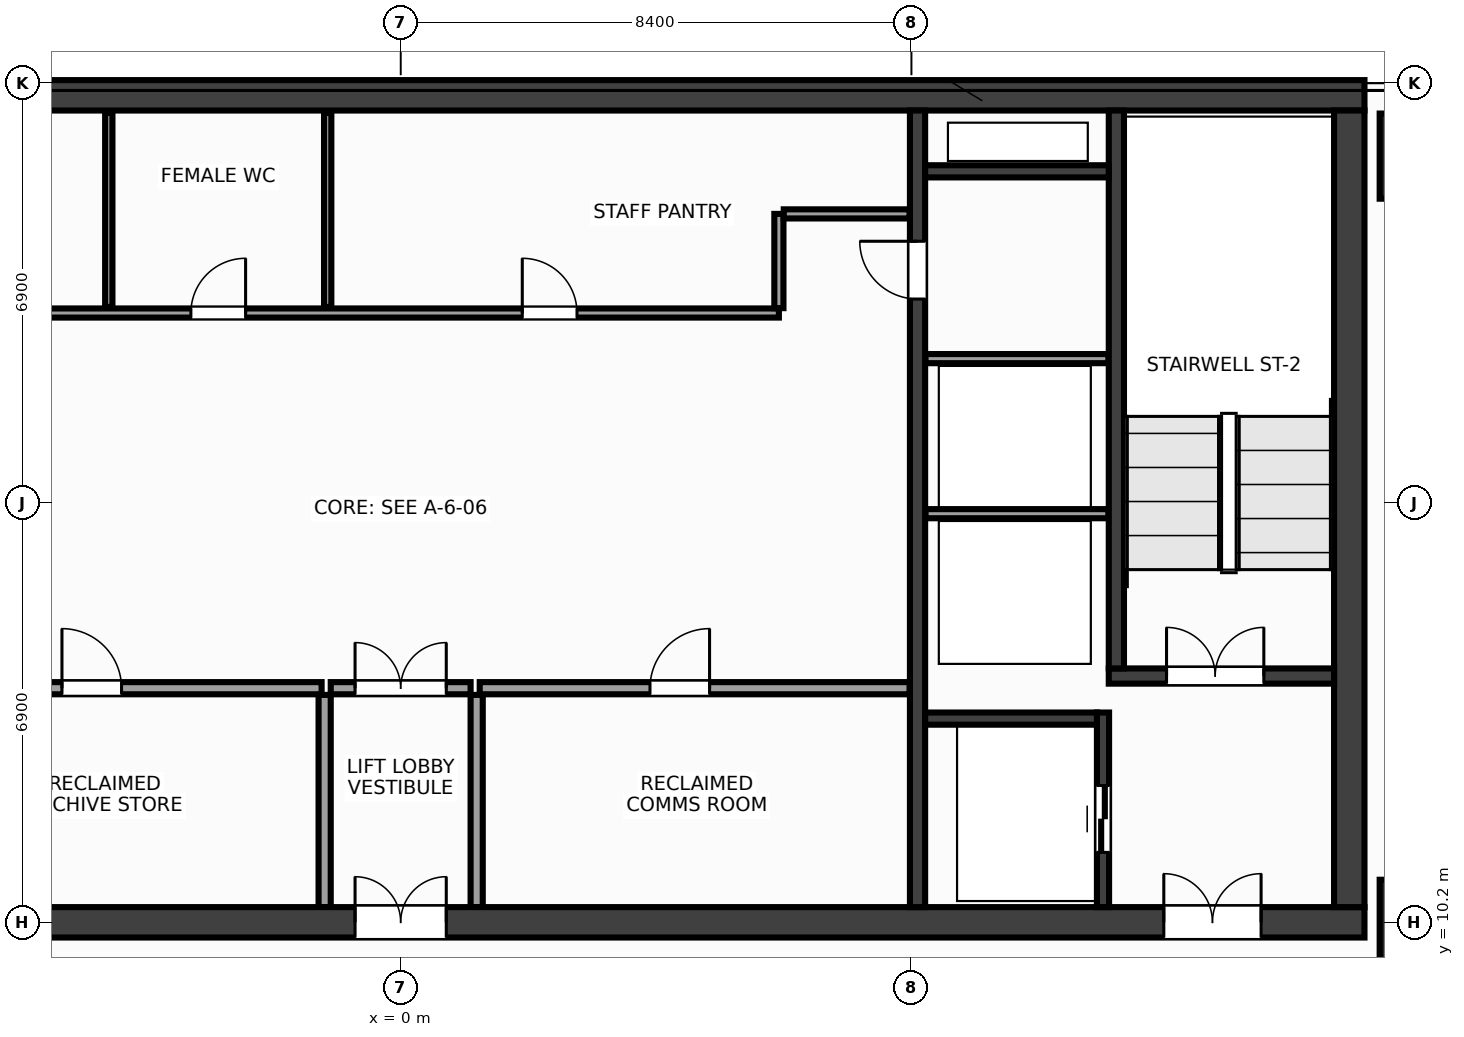
"""IFC4 building model, lengths in metres.
Left out: names, types, materials, properties, quantities, classifications, styles, units other than length and angle.
Written with IfcOpenShell. Run it as: python <this file> out.ifc"""

import sys

from ifc_helpers import new_model, si_unit, direction, frame, frame_2d, origin, origin_2d, place, context, subcontext, project, spatial, rectangle, extrude, source, transform, mapped, element, fill, save


model = new_model("IFC4")
c1 = context("Model", 3, precision=1e-05, world=origin(), true_north=direction((0.0, 1.0)))
c2 = subcontext(c1, "Body", "Model", "MODEL_VIEW")
j1 = project(units=[si_unit("LENGTHUNIT", "METRE"), si_unit("PLANEANGLEUNIT", "RADIAN")], contexts=[c1])
p1 = place(None, origin())
s1 = spatial("IfcSite", under=j1, at=p1, CompositionType="ELEMENT")
p2 = place(p1, origin())
s2 = spatial("IfcBuilding", under=s1, at=p2, CompositionType="ELEMENT")
p3 = place(p2, frame((0.0, 0.0, 200.0)))
s3 = spatial("IfcBuildingStorey", under=s2, at=p3, CompositionType="ELEMENT", Elevation=200.0)
m1 = source(origin(), c2, "Body", "SweptSolid", [
    extrude(rectangle(XDim=31.7, YDim=0.5, at=frame_2d((15.85, 0.0))), origin(), (0.0, 0.0, 1.0), 3.6),
])
p4 = place(p3, frame((-15.85, 23.8, 0.0), z_axis=(0.0, 0.0, 1.0), x_axis=(1.0, 0.0, 0.0)))
e1 = element("IfcWall", 1, at=p4, inside=s3, PredefinedType="SHEAR", context=c2, shape_type="MappedRepresentation", body=[
    mapped(m1, transform((0.0, 0.0, 0.0), x_axis=(1.0, 0.0, 0.0), y_axis=(0.0, 1.0, 0.0), z_axis=(0.0, 0.0, 1.0), scale=1.0)),
])
p5 = place(p3, frame((-15.85, 10.2, 0.0), z_axis=(0.0, 0.0, 1.0), x_axis=(1.0, 0.0, 0.0)))
e2 = element("IfcWall", 2, at=p5, inside=s3, PredefinedType="SHEAR", context=c2, shape_type="MappedRepresentation", body=[
    mapped(m1, transform((0.0, 0.0, 0.0), x_axis=(1.0, 0.0, 0.0), y_axis=(0.0, 1.0, 0.0), z_axis=(0.0, 0.0, 1.0), scale=1.0)),
])
p6 = place(p5, frame((1.7, 0.0, 0.0)))
e3 = element("IfcOpeningElement", 3, at=p6, cuts=e2, PredefinedType="OPENING", context=c2, shape_type="SweptSolid", body=[
    extrude(rectangle(XDim=1.6, YDim=2.15, at=frame_2d((0.8, 1.075))), frame((0.0, 0.262, 0.0), z_axis=(0.0, -1.0, 0.0), x_axis=(1.0, 0.0, 0.0)), (0.0, 0.0, 1.0), 0.524),
])
p7 = place(p5, frame((28.4, 0.0, 0.0)))
e4 = element("IfcOpeningElement", 4, at=p7, cuts=e2, PredefinedType="OPENING", context=c2, shape_type="SweptSolid", body=[
    extrude(rectangle(XDim=1.6, YDim=2.15, at=frame_2d((0.8, 1.075))), frame((0.0, 0.262, 0.0), z_axis=(0.0, -1.0, 0.0), x_axis=(1.0, 0.0, 0.0)), (0.0, 0.0, 1.0), 0.524),
])
p8 = place(p5, frame((15.1, 0.0, 0.0)))
e5 = element("IfcOpeningElement", 5, at=p8, cuts=e2, PredefinedType="OPENING", context=c2, shape_type="SweptSolid", body=[
    extrude(rectangle(XDim=1.5, YDim=2.2, at=frame_2d((0.75, 1.1))), frame((0.0, 0.262, 0.0), z_axis=(0.0, -1.0, 0.0), x_axis=(1.0, 0.0, 0.0)), (0.0, 0.0, 1.0), 0.524),
])
m2 = source(origin(), c2, "Body", "SweptSolid", [
    extrude(rectangle(XDim=13.1, YDim=0.5, at=frame_2d((6.55, 0.0))), origin(), (0.0, 0.0, 1.0), 3.6),
])
p9 = place(p3, frame((15.6, 10.45, 0.0), z_axis=(0.0, 0.0, 1.0), x_axis=(0.0, 1.0, 0.0)))
e6 = element("IfcWall", 6, at=p9, inside=s3, PredefinedType="SHEAR", context=c2, shape_type="MappedRepresentation", body=[
    mapped(m2, transform((0.0, 0.0, 0.0), x_axis=(1.0, 0.0, 0.0), y_axis=(0.0, 1.0, 0.0), z_axis=(0.0, 0.0, 1.0), scale=1.0)),
])
m3 = source(origin(), c2, "Body", "SweptSolid", [
    extrude(rectangle(XDim=13.1, YDim=0.25, at=frame_2d((6.55, 0.0))), origin(), (0.0, 0.0, 1.0), 3.6),
])
p10 = place(p3, frame((8.5, 10.45, 0.0), z_axis=(0.0, 0.0, 1.0), x_axis=(0.0, 1.0, 0.0)))
e7 = element("IfcWall", 7, at=p10, inside=s3, PredefinedType="SHEAR", context=c2, shape_type="MappedRepresentation", body=[
    mapped(m3, transform((0.0, 0.0, 0.0), x_axis=(1.0, 0.0, 0.0), y_axis=(0.0, 1.0, 0.0), z_axis=(0.0, 0.0, 1.0), scale=1.0)),
])
p11 = place(p10, frame((10.0, 0.0, 0.0)))
e8 = element("IfcOpeningElement", 8, at=p11, cuts=e7, PredefinedType="OPENING", context=c2, shape_type="SweptSolid", body=[
    extrude(rectangle(XDim=0.95, YDim=2.15, at=frame_2d((0.475, 1.075))), frame((0.0, 0.137, 0.0), z_axis=(0.0, -1.0, 0.0), x_axis=(1.0, 0.0, 0.0)), (0.0, 0.0, 1.0), 0.274),
])
m4 = source(origin(), c2, "Body", "SweptSolid", [
    extrude(rectangle(XDim=3.705, YDim=0.25, at=frame_2d((1.853, 0.0))), origin(), (0.0, 0.0, 1.0), 3.6),
])
p12 = place(p3, frame((11.645, 14.25, 0.0), z_axis=(0.0, 0.0, 1.0), x_axis=(1.0, 0.0, 0.0)))
e9 = element("IfcWall", 9, at=p12, inside=s3, PredefinedType="SHEAR", context=c2, shape_type="MappedRepresentation", body=[
    mapped(m4, transform((0.0, 0.0, 0.0), x_axis=(1.0, 0.0, 0.0), y_axis=(0.0, 1.0, 0.0), z_axis=(0.0, 0.0, 1.0), scale=1.0)),
])
p13 = place(p12, frame((0.95, 0.0, 0.0)))
e10 = element("IfcOpeningElement", 10, at=p13, cuts=e9, PredefinedType="OPENING", context=c2, shape_type="SweptSolid", body=[
    extrude(rectangle(XDim=1.6, YDim=2.15, at=frame_2d((0.8, 1.075))), frame((0.0, 0.137, 0.0), z_axis=(0.0, -1.0, 0.0), x_axis=(1.0, 0.0, 0.0)), (0.0, 0.0, 1.0), 0.274),
])
m5 = source(origin(), c2, "Body", "SweptSolid", [
    extrude(rectangle(XDim=9.175, YDim=0.25, at=frame_2d((4.587, 0.0))), origin(), (0.0, 0.0, 1.0), 3.6),
])
p14 = place(p3, frame((11.77, 14.375, 0.0), z_axis=(0.0, 0.0, 1.0), x_axis=(0.0, 1.0, 0.0)))
e11 = element("IfcWall", 11, at=p14, inside=s3, PredefinedType="SHEAR", context=c2, shape_type="MappedRepresentation", body=[
    mapped(m5, transform((0.0, 0.0, 0.0), x_axis=(1.0, 0.0, 0.0), y_axis=(0.0, 1.0, 0.0), z_axis=(0.0, 0.0, 1.0), scale=1.0)),
])
m6 = source(origin(), c2, "Body", "SweptSolid", [
    extrude(rectangle(XDim=3.2, YDim=0.2, at=frame_2d((1.6, 0.0))), origin(), (0.0, 0.0, 1.0), 3.6),
])
p15 = place(p3, frame((11.55, 10.45, 0.0), z_axis=(0.0, 0.0, 1.0), x_axis=(0.0, 1.0, 0.0)))
e12 = element("IfcWall", 12, at=p15, inside=s3, PredefinedType="SHEAR", context=c2, shape_type="MappedRepresentation", body=[
    mapped(m6, transform((0.0, 0.0, 0.0), x_axis=(1.0, 0.0, 0.0), y_axis=(0.0, 1.0, 0.0), z_axis=(0.0, 0.0, 1.0), scale=1.0)),
])
p16 = place(p15, frame((0.9, 0.0, 0.0)))
e13 = element("IfcOpeningElement", 13, at=p16, cuts=e12, PredefinedType="OPENING", context=c2, shape_type="SweptSolid", body=[
    extrude(rectangle(XDim=1.1, YDim=2.15, at=frame_2d((0.55, 1.075))), frame((0.0, 0.112, 0.0), z_axis=(0.0, -1.0, 0.0), x_axis=(1.0, 0.0, 0.0)), (0.0, 0.0, 1.0), 0.224),
])
m7 = source(origin(), c2, "Body", "SweptSolid", [
    extrude(rectangle(XDim=2.825, YDim=0.2, at=frame_2d((1.413, 0.0))), origin(), (0.0, 0.0, 1.0), 3.6),
])
p17 = place(p3, frame((8.625, 13.55, 0.0), z_axis=(0.0, 0.0, 1.0), x_axis=(1.0, 0.0, 0.0)))
e14 = element("IfcWall", 14, at=p17, inside=s3, PredefinedType="SHEAR", context=c2, shape_type="MappedRepresentation", body=[
    mapped(m7, transform((0.0, 0.0, 0.0), x_axis=(1.0, 0.0, 0.0), y_axis=(0.0, 1.0, 0.0), z_axis=(0.0, 0.0, 1.0), scale=1.0)),
])
m8 = source(origin(), c2, "Body", "SweptSolid", [
    extrude(rectangle(XDim=3.02, YDim=0.2, at=frame_2d((1.51, 0.0))), origin(), (0.0, 0.0, 1.0), 3.6),
])
p18 = place(p3, frame((8.625, 22.55, 0.0), z_axis=(0.0, 0.0, 1.0), x_axis=(1.0, 0.0, 0.0)))
e15 = element("IfcWall", 15, at=p18, inside=s3, PredefinedType="SHEAR", context=c2, shape_type="MappedRepresentation", body=[
    mapped(m8, transform((0.0, 0.0, 0.0), x_axis=(1.0, 0.0, 0.0), y_axis=(0.0, 1.0, 0.0), z_axis=(0.0, 0.0, 1.0), scale=1.0)),
])
m9 = source(origin(), c2, "Body", "SweptSolid", [
    extrude(rectangle(XDim=1.4, YDim=1.4, at=origin_2d()), origin(), (0.0, 0.0, 1.0), 3.6),
])
for number, where, z_axis, x_axis in (
    (16, (16.8, 10.2, 0.0), (0.0, 0.0, 1.0), (1.0, 0.0, 0.0)),
    (17, (16.8, 22.8, 0.0), (0.0, 0.0, 1.0), (1.0, 0.0, 0.0)),
):
    element("IfcColumn", number, at=place(p3, frame(where, z_axis=z_axis, x_axis=x_axis)), inside=s3, PredefinedType="COLUMN", context=c2, shape_type="MappedRepresentation", body=[
        mapped(m9, transform((0.0, 0.0, 0.0), x_axis=(1.0, 0.0, 0.0), y_axis=(0.0, 1.0, 0.0), z_axis=(0.0, 0.0, 1.0), scale=1.0)),
    ])
m10 = source(origin(), c2, "Body", "SweptSolid", [
    extrude(rectangle(XDim=3.01, YDim=0.15, at=frame_2d((1.505, 0.0))), origin(), (0.0, 0.0, 1.0), 3.38),
])
for number, where, z_axis, x_axis in (
    (18, (8.63, 16.92, 0.0), (0.0, 0.0, 1.0), (1.0, 0.0, 0.0)),
    (19, (8.63, 19.47, 0.0), (0.0, 0.0, 1.0), (1.0, 0.0, 0.0)),
):
    element("IfcWall", number, at=place(p3, frame(where, z_axis=z_axis, x_axis=x_axis)), inside=s3, PredefinedType="PARTITIONING", context=c2, shape_type="MappedRepresentation", body=[
        mapped(m10, transform((0.0, 0.0, 0.0), x_axis=(1.0, 0.0, 0.0), y_axis=(0.0, 1.0, 0.0), z_axis=(0.0, 0.0, 1.0), scale=1.0)),
    ])
m11 = source(origin(), c2, "Body", "SweptSolid", [
    extrude(rectangle(XDim=7.07, YDim=0.2, at=frame_2d((3.535, 0.0))), origin(), (0.0, 0.0, 1.0), 3.38),
])
p19 = place(p3, frame((-8.37, 14.05, 0.0), z_axis=(0.0, 0.0, 1.0), x_axis=(1.0, 0.0, 0.0)))
e20 = element("IfcWall", 20, at=p19, inside=s3, PredefinedType="PARTITIONING", context=c2, shape_type="MappedRepresentation", body=[
    mapped(m11, transform((0.0, 0.0, 0.0), x_axis=(1.0, 0.0, 0.0), y_axis=(0.0, 1.0, 0.0), z_axis=(0.0, 0.0, 1.0), scale=1.0)),
])
p20 = place(p19, frame((2.8, 0.0, 0.0)))
e21 = element("IfcOpeningElement", 21, at=p20, cuts=e20, PredefinedType="OPENING", context=c2, shape_type="SweptSolid", body=[
    extrude(rectangle(XDim=0.98, YDim=2.15, at=frame_2d((0.49, 1.075))), frame((0.0, 0.112, 0.0), z_axis=(0.0, -1.0, 0.0), x_axis=(1.0, 0.0, 0.0)), (0.0, 0.0, 1.0), 0.224),
])
p21 = place(p3, frame((1.3, 14.05, 0.0), z_axis=(0.0, 0.0, 1.0), x_axis=(1.0, 0.0, 0.0)))
e22 = element("IfcWall", 22, at=p21, inside=s3, PredefinedType="PARTITIONING", context=c2, shape_type="MappedRepresentation", body=[
    mapped(m11, transform((0.0, 0.0, 0.0), x_axis=(1.0, 0.0, 0.0), y_axis=(0.0, 1.0, 0.0), z_axis=(0.0, 0.0, 1.0), scale=1.0)),
])
p22 = place(p21, frame((2.8, 0.0, 0.0)))
e23 = element("IfcOpeningElement", 23, at=p22, cuts=e22, PredefinedType="OPENING", context=c2, shape_type="SweptSolid", body=[
    extrude(rectangle(XDim=0.98, YDim=2.15, at=frame_2d((0.49, 1.075))), frame((0.0, 0.112, 0.0), z_axis=(0.0, -1.0, 0.0), x_axis=(1.0, 0.0, 0.0)), (0.0, 0.0, 1.0), 0.224),
])
m12 = source(origin(), c2, "Body", "SweptSolid", [
    extrude(rectangle(XDim=3.49, YDim=0.2, at=frame_2d((1.745, 0.0))), origin(), (0.0, 0.0, 1.0), 3.38),
])
for number, where, z_axis, x_axis in (
    (24, (-1.25, 10.45, 0.0), (0.0, 0.0, 1.0), (0.0, 1.0, 0.0)),
    (25, (1.25, 10.45, 0.0), (0.0, 0.0, 1.0), (0.0, 1.0, 0.0)),
):
    element("IfcWall", number, at=place(p3, frame(where, z_axis=z_axis, x_axis=x_axis)), inside=s3, PredefinedType="PARTITIONING", context=c2, shape_type="MappedRepresentation", body=[
        mapped(m12, transform((0.0, 0.0, 0.0), x_axis=(1.0, 0.0, 0.0), y_axis=(0.0, 1.0, 0.0), z_axis=(0.0, 0.0, 1.0), scale=1.0)),
    ])
m13 = source(origin(), c2, "Body", "SweptSolid", [
    extrude(rectangle(XDim=2.3, YDim=0.2, at=frame_2d((1.15, 0.0))), origin(), (0.0, 0.0, 1.0), 3.38),
])
p23 = place(p3, frame((-1.15, 14.05, 0.0), z_axis=(0.0, 0.0, 1.0), x_axis=(1.0, 0.0, 0.0)))
e26 = element("IfcWall", 26, at=p23, inside=s3, PredefinedType="PARTITIONING", context=c2, shape_type="MappedRepresentation", body=[
    mapped(m13, transform((0.0, 0.0, 0.0), x_axis=(1.0, 0.0, 0.0), y_axis=(0.0, 1.0, 0.0), z_axis=(0.0, 0.0, 1.0), scale=1.0)),
])
p24 = place(p23, frame((0.4, 0.0, 0.0)))
e27 = element("IfcOpeningElement", 27, at=p24, cuts=e26, PredefinedType="OPENING", context=c2, shape_type="SweptSolid", body=[
    extrude(rectangle(XDim=1.5, YDim=2.2, at=frame_2d((0.75, 1.1))), frame((0.0, 0.112, 0.0), z_axis=(0.0, -1.0, 0.0), x_axis=(1.0, 0.0, 0.0)), (0.0, 0.0, 1.0), 0.224),
])
m14 = source(origin(), c2, "Body", "SweptSolid", [
    extrude(rectangle(XDim=14.59, YDim=0.15, at=frame_2d((7.295, 0.0))), origin(), (0.0, 0.0, 1.0), 3.38),
])
p25 = place(p3, frame((-8.37, 20.22, 0.0), z_axis=(0.0, 0.0, 1.0), x_axis=(1.0, 0.0, 0.0)))
e28 = element("IfcWall", 28, at=p25, inside=s3, PredefinedType="PARTITIONING", context=c2, shape_type="MappedRepresentation", body=[
    mapped(m14, transform((0.0, 0.0, 0.0), x_axis=(1.0, 0.0, 0.0), y_axis=(0.0, 1.0, 0.0), z_axis=(0.0, 0.0, 1.0), scale=1.0)),
])
p26 = place(p25, frame((1.36, 0.0, 0.0)))
e29 = element("IfcOpeningElement", 29, at=p26, cuts=e28, PredefinedType="OPENING", context=c2, shape_type="SweptSolid", body=[
    extrude(rectangle(XDim=0.9, YDim=2.15, at=frame_2d((0.45, 1.075))), frame((0.0, 0.087, 0.0), z_axis=(0.0, -1.0, 0.0), x_axis=(1.0, 0.0, 0.0)), (0.0, 0.0, 1.0), 0.174),
])
p27 = place(p25, frame((4.92, 0.0, 0.0)))
e30 = element("IfcOpeningElement", 30, at=p27, cuts=e28, PredefinedType="OPENING", context=c2, shape_type="SweptSolid", body=[
    extrude(rectangle(XDim=0.9, YDim=2.15, at=frame_2d((0.45, 1.075))), frame((0.0, 0.087, 0.0), z_axis=(0.0, -1.0, 0.0), x_axis=(1.0, 0.0, 0.0)), (0.0, 0.0, 1.0), 0.174),
])
p28 = place(p25, frame((10.37, 0.0, 0.0)))
e31 = element("IfcOpeningElement", 31, at=p28, cuts=e28, PredefinedType="OPENING", context=c2, shape_type="SweptSolid", body=[
    extrude(rectangle(XDim=0.9, YDim=2.15, at=frame_2d((0.45, 1.075))), frame((0.0, 0.087, 0.0), z_axis=(0.0, -1.0, 0.0), x_axis=(1.0, 0.0, 0.0)), (0.0, 0.0, 1.0), 0.174),
])
m15 = source(origin(), c2, "Body", "SweptSolid", [
    extrude(rectangle(XDim=1.55, YDim=0.15, at=frame_2d((0.775, 0.0))), origin(), (0.0, 0.0, 1.0), 3.38),
])
p29 = place(p3, frame((6.22, 20.3, 0.0), z_axis=(0.0, 0.0, 1.0), x_axis=(0.0, 1.0, 0.0)))
e32 = element("IfcWall", 32, at=p29, inside=s3, PredefinedType="PARTITIONING", context=c2, shape_type="MappedRepresentation", body=[
    mapped(m15, transform((0.0, 0.0, 0.0), x_axis=(1.0, 0.0, 0.0), y_axis=(0.0, 1.0, 0.0), z_axis=(0.0, 0.0, 1.0), scale=1.0)),
])
m16 = source(origin(), c2, "Body", "SweptSolid", [
    extrude(rectangle(XDim=2.07, YDim=0.15, at=frame_2d((1.035, 0.0))), origin(), (0.0, 0.0, 1.0), 3.38),
])
p30 = place(p3, frame((6.3, 21.85, 0.0), z_axis=(0.0, 0.0, 1.0), x_axis=(1.0, 0.0, 0.0)))
e33 = element("IfcWall", 33, at=p30, inside=s3, PredefinedType="PARTITIONING", context=c2, shape_type="MappedRepresentation", body=[
    mapped(m16, transform((0.0, 0.0, 0.0), x_axis=(1.0, 0.0, 0.0), y_axis=(0.0, 1.0, 0.0), z_axis=(0.0, 0.0, 1.0), scale=1.0)),
])
m17 = source(origin(), c2, "Body", "SweptSolid", [
    extrude(rectangle(XDim=3.19, YDim=0.12, at=frame_2d((1.595, 0.0))), origin(), (0.0, 0.0, 1.0), 3.38),
])
for number, where, z_axis, x_axis in (
    (34, (-4.8, 20.32, 0.0), (0.0, 0.0, 1.0), (0.0, 1.0, 0.0)),
    (35, (-1.2, 20.32, 0.0), (0.0, 0.0, 1.0), (0.0, 1.0, 0.0)),
):
    element("IfcWall", number, at=place(p3, frame(where, z_axis=z_axis, x_axis=x_axis)), inside=s3, PredefinedType="PARTITIONING", context=c2, shape_type="MappedRepresentation", body=[
        mapped(m17, transform((0.0, 0.0, 0.0), x_axis=(1.0, 0.0, 0.0), y_axis=(0.0, 1.0, 0.0), z_axis=(0.0, 0.0, 1.0), scale=1.0)),
    ])
m18 = source(origin(), c2, "Body", "SweptSolid", [
    extrude(rectangle(XDim=1.6, YDim=2.15, at=frame_2d((0.8, 1.075))), frame((0.0, 0.025, 0.0), z_axis=(0.0, -1.0, 0.0), x_axis=(1.0, 0.0, 0.0)), (0.0, 0.0, 1.0), 0.05),
])
p31 = place(p13, origin())
e36 = element("IfcDoor", 36, at=p31, inside=s3, OperationType="DOUBLE_DOOR_SINGLE_SWING", PredefinedType="DOOR", context=c2, shape_type="MappedRepresentation", body=[
    mapped(m18, transform((0.0, 0.0, 0.0), x_axis=(1.0, 0.0, 0.0), y_axis=(0.0, 1.0, 0.0), z_axis=(0.0, 0.0, 1.0), scale=1.0)),
])
fill(e10, e36)
p32 = place(p7, origin())
e37 = element("IfcDoor", 37, at=p32, inside=s3, OperationType="DOUBLE_DOOR_SINGLE_SWING", PredefinedType="DOOR", context=c2, shape_type="MappedRepresentation", body=[
    mapped(m18, transform((0.0, 0.0, 0.0), x_axis=(1.0, 0.0, 0.0), y_axis=(0.0, 1.0, 0.0), z_axis=(0.0, 0.0, 1.0), scale=1.0)),
])
fill(e4, e37)
m19 = source(origin(), c2, "Body", "SweptSolid", [
    extrude(rectangle(XDim=1.1, YDim=2.15, at=frame_2d((0.55, 1.075))), frame((0.0, 0.025, 0.0), z_axis=(0.0, -1.0, 0.0), x_axis=(1.0, 0.0, 0.0)), (0.0, 0.0, 1.0), 0.05),
])
p33 = place(p16, origin())
e38 = element("IfcDoor", 38, at=p33, inside=s3, OperationType="DOUBLE_DOOR_SLIDING", PredefinedType="DOOR", context=c2, shape_type="MappedRepresentation", body=[
    mapped(m19, transform((0.0, 0.0, 0.0), x_axis=(1.0, 0.0, 0.0), y_axis=(0.0, 1.0, 0.0), z_axis=(0.0, 0.0, 1.0), scale=1.0)),
])
fill(e13, e38)
m20 = source(origin(), c2, "Body", "SweptSolid", [
    extrude(rectangle(XDim=0.95, YDim=2.15, at=frame_2d((0.475, 1.075))), frame((0.0, 0.025, 0.0), z_axis=(0.0, -1.0, 0.0), x_axis=(1.0, 0.0, 0.0)), (0.0, 0.0, 1.0), 0.05),
])
p34 = place(p11, origin())
e39 = element("IfcDoor", 39, at=p34, inside=s3, OperationType="SINGLE_SWING_RIGHT", PredefinedType="DOOR", context=c2, shape_type="MappedRepresentation", body=[
    mapped(m20, transform((0.0, 0.0, 0.0), x_axis=(1.0, 0.0, 0.0), y_axis=(0.0, 1.0, 0.0), z_axis=(0.0, 0.0, 1.0), scale=1.0)),
])
fill(e8, e39)
m21 = source(origin(), c2, "Body", "SweptSolid", [
    extrude(rectangle(XDim=0.98, YDim=2.15, at=frame_2d((0.49, 1.075))), frame((0.0, 0.025, 0.0), z_axis=(0.0, -1.0, 0.0), x_axis=(1.0, 0.0, 0.0)), (0.0, 0.0, 1.0), 0.05),
])
p35 = place(p20, origin())
e40 = element("IfcDoor", 40, at=p35, inside=s3, OperationType="SINGLE_SWING_LEFT", PredefinedType="DOOR", context=c2, shape_type="MappedRepresentation", body=[
    mapped(m21, transform((0.0, 0.0, 0.0), x_axis=(1.0, 0.0, 0.0), y_axis=(0.0, 1.0, 0.0), z_axis=(0.0, 0.0, 1.0), scale=1.0)),
])
fill(e21, e40)
p36 = place(p22, origin())
e41 = element("IfcDoor", 41, at=p36, inside=s3, OperationType="SINGLE_SWING_RIGHT", PredefinedType="DOOR", context=c2, shape_type="MappedRepresentation", body=[
    mapped(m21, transform((0.0, 0.0, 0.0), x_axis=(1.0, 0.0, 0.0), y_axis=(0.0, 1.0, 0.0), z_axis=(0.0, 0.0, 1.0), scale=1.0)),
])
fill(e23, e41)
m22 = source(origin(), c2, "Body", "SweptSolid", [
    extrude(rectangle(XDim=1.5, YDim=2.2, at=frame_2d((0.75, 1.1))), frame((0.0, 0.025, 0.0), z_axis=(0.0, -1.0, 0.0), x_axis=(1.0, 0.0, 0.0)), (0.0, 0.0, 1.0), 0.05),
])
p37 = place(p24, origin())
e42 = element("IfcDoor", 42, at=p37, inside=s3, OperationType="DOUBLE_DOOR_SINGLE_SWING", PredefinedType="DOOR", context=c2, shape_type="MappedRepresentation", body=[
    mapped(m22, transform((0.0, 0.0, 0.0), x_axis=(1.0, 0.0, 0.0), y_axis=(0.0, 1.0, 0.0), z_axis=(0.0, 0.0, 1.0), scale=1.0)),
])
fill(e27, e42)
p38 = place(p8, origin())
e43 = element("IfcDoor", 43, at=p38, inside=s3, OperationType="DOUBLE_DOOR_SINGLE_SWING", PredefinedType="DOOR", context=c2, shape_type="MappedRepresentation", body=[
    mapped(m22, transform((0.0, 0.0, 0.0), x_axis=(1.0, 0.0, 0.0), y_axis=(0.0, 1.0, 0.0), z_axis=(0.0, 0.0, 1.0), scale=1.0)),
])
fill(e5, e43)
m23 = source(origin(), c2, "Body", "SweptSolid", [
    extrude(rectangle(XDim=0.9, YDim=2.15, at=frame_2d((0.45, 1.075))), frame((0.0, 0.025, 0.0), z_axis=(0.0, -1.0, 0.0), x_axis=(1.0, 0.0, 0.0)), (0.0, 0.0, 1.0), 0.05),
])
p39 = place(p27, origin())
e44 = element("IfcDoor", 44, at=p39, inside=s3, OperationType="SINGLE_SWING_RIGHT", PredefinedType="DOOR", context=c2, shape_type="MappedRepresentation", body=[
    mapped(m23, transform((0.0, 0.0, 0.0), x_axis=(1.0, 0.0, 0.0), y_axis=(0.0, 1.0, 0.0), z_axis=(0.0, 0.0, 1.0), scale=1.0)),
])
fill(e30, e44)
p40 = place(p28, origin())
e45 = element("IfcDoor", 45, at=p40, inside=s3, OperationType="SINGLE_SWING_LEFT", PredefinedType="DOOR", context=c2, shape_type="MappedRepresentation", body=[
    mapped(m23, transform((0.0, 0.0, 0.0), x_axis=(1.0, 0.0, 0.0), y_axis=(0.0, 1.0, 0.0), z_axis=(0.0, 0.0, 1.0), scale=1.0)),
])
fill(e31, e45)
save(model, sys.argv[1])
